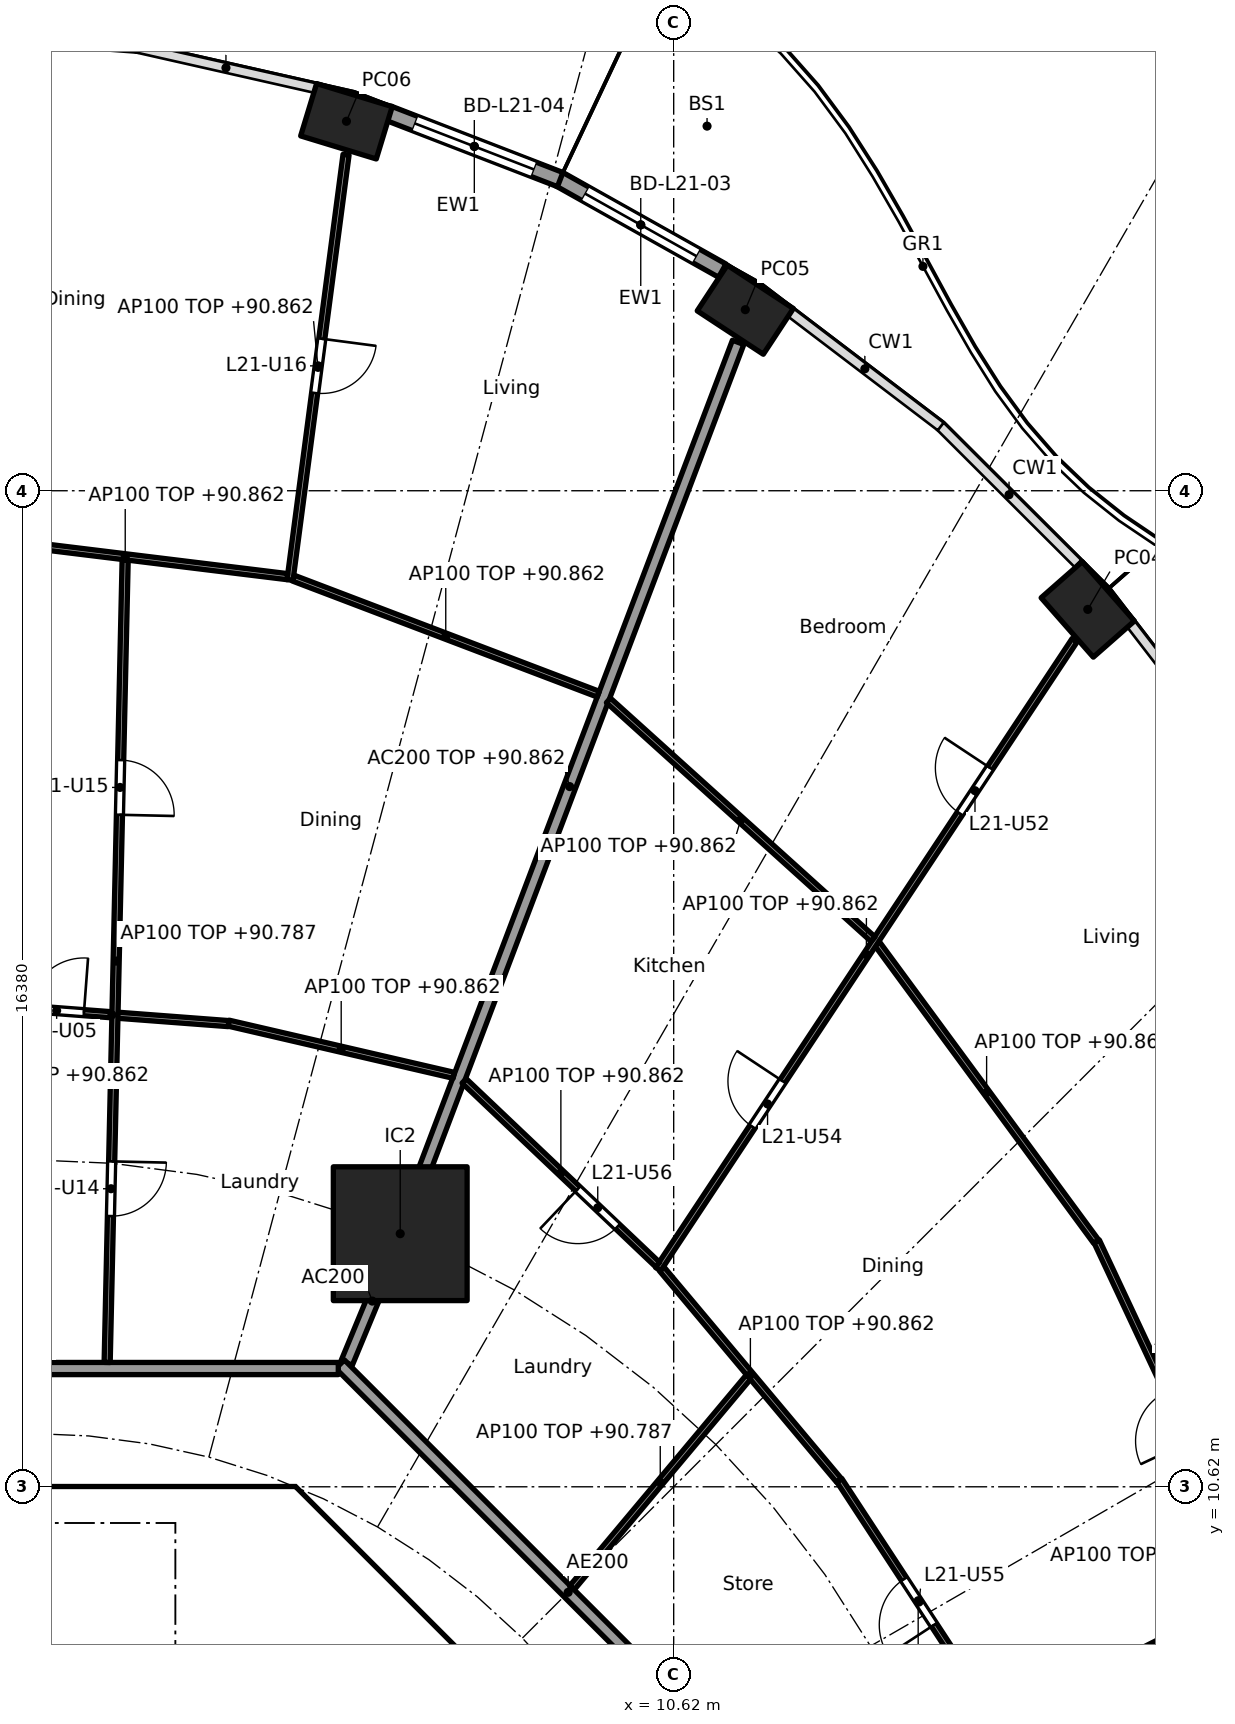
"""IFC4 building model, lengths in metres.
Left out: names, types, materials, properties, quantities, classifications, styles, units other than length and angle.
Written with IfcOpenShell. Run it as: python <this file> out.ifc"""

import sys

from ifc_helpers import new_model, si_unit, direction, frame, frame_2d, origin, origin_2d, place, context, subcontext, project, spatial, polyline, rectangle, hollow_rectangle, outline, extrude, element, fill, save


model = new_model("IFC4")
c1 = context("Model", 3, precision=1e-05, world=origin(), true_north=direction((0.0, 1.0)))
c2 = subcontext(c1, "Body", "Model", "MODEL_VIEW")
j1 = project(units=[si_unit("LENGTHUNIT", "METRE"), si_unit("PLANEANGLEUNIT", "RADIAN")], contexts=[c1])
p1 = place(None, origin())
s1 = spatial("IfcSite", under=j1, at=p1, CompositionType="ELEMENT")
p2 = place(p1, origin())
s2 = spatial("IfcBuilding", under=s1, at=p2, CompositionType="ELEMENT")
p3 = place(p2, frame((0.0, 0.0, 88.1)))
s3 = spatial("IfcBuildingStorey", under=s2, at=p3, CompositionType="ELEMENT", Elevation=88.1)
for number, where, z_axis, x_axis in (
    (1, (17.43, 25.049, 0.0), (0.0, 0.0, 1.0), (-0.66, 0.751, 0.0)),
    (2, (11.798, 29.978, 0.0), (0.0, 0.0, 1.0), (-0.836, 0.549, 0.0)),
    (3, (5.239, 33.076, 0.0), (0.0, 0.0, 1.0), (-0.957, 0.292, 0.0)),
):
    element("IfcColumn", number, at=place(p3, frame(where, z_axis=z_axis, x_axis=x_axis)), inside=s3, PredefinedType="COLUMN", context=c2, shape_type="SweptSolid", body=[
        extrude(hollow_rectangle(XDim=1.3, YDim=0.9, WallThickness=0.045, at=origin_2d()), origin(), (0.0, 0.0, 1.0), 3.7),
    ])
p4 = place(p3, frame((6.123, 14.782, 0.0), z_axis=(0.0, 0.0, 1.0), x_axis=(1.0, 0.0, 0.0)))
e4 = element("IfcColumn", 4, at=p4, inside=s3, PredefinedType="COLUMN", context=c2, shape_type="SweptSolid", body=[
    extrude(rectangle(XDim=2.2, YDim=2.2, at=origin_2d()), origin(), (0.0, 0.0, 1.0), 3.7),
])
p5 = place(p3, frame((8.737, 32.125, 0.0), z_axis=(0.0, 0.0, 1.0), x_axis=(0.872071158476, -0.489379090843, 0.0)))
e5 = element("IfcWall", 5, at=p5, inside=s3, PredefinedType="SOLIDWALL", context=c2, shape_type="SweptSolid", body=[
    extrude(rectangle(XDim=3.076, YDim=0.25, at=frame_2d((1.538, 0.0))), origin(), (0.0, 0.0, 1.0), 3.44),
])
p6 = place(p5, frame((0.488, 0.0, 0.0)))
e6 = element("IfcOpeningElement", 6, at=p6, cuts=e5, PredefinedType="OPENING", context=c2, shape_type="SweptSolid", body=[
    extrude(rectangle(XDim=2.1, YDim=2.4, at=frame_2d((1.05, 1.2))), frame((0.0, 0.135, 0.0), z_axis=(0.0, -1.0, 0.0), x_axis=(1.0, 0.0, 0.0)), (0.0, 0.0, 1.0), 0.27),
])
p7 = place(p3, frame((5.929, 33.208, 0.0), z_axis=(0.0, 0.0, 1.0), x_axis=(0.932837560624, -0.360297218263, 0.0)))
e7 = element("IfcWall", 7, at=p7, inside=s3, PredefinedType="SOLIDWALL", context=c2, shape_type="SweptSolid", body=[
    extrude(rectangle(XDim=3.028, YDim=0.25, at=frame_2d((1.514, 0.0))), origin(), (0.0, 0.0, 1.0), 3.44),
])
p8 = place(p7, frame((0.464, 0.0, 0.0)))
e8 = element("IfcOpeningElement", 8, at=p8, cuts=e7, PredefinedType="OPENING", context=c2, shape_type="SweptSolid", body=[
    extrude(rectangle(XDim=2.1, YDim=2.4, at=frame_2d((1.05, 1.2))), frame((0.0, 0.135, 0.0), z_axis=(0.0, -1.0, 0.0), x_axis=(1.0, 0.0, 0.0)), (0.0, 0.0, 1.0), 0.27),
])
p9 = place(p3, frame((9.988, 4.613, 0.0), z_axis=(0.0, 0.0, 1.0), x_axis=(-0.707106781187, 0.707106781187, 0.0)))
e9 = element("IfcWall", 9, at=p9, inside=s3, PredefinedType="SHEAR", context=c2, shape_type="SweptSolid", body=[
    extrude(rectangle(XDim=7.602, YDim=0.6, at=frame_2d((3.801, 0.0))), origin(), (0.0, 0.0, 1.0), 3.44),
])
p10 = place(p9, frame((3.201, 0.0, 0.0)))
e10 = element("IfcOpeningElement", 10, at=p10, cuts=e9, PredefinedType="OPENING", context=c2, shape_type="SweptSolid", body=[
    extrude(rectangle(XDim=1.2, YDim=2.1, at=frame_2d((0.6, 1.05))), frame((0.0, 0.31, 0.0), z_axis=(0.0, -1.0, 0.0), x_axis=(1.0, 0.0, 0.0)), (0.0, 0.0, 1.0), 0.62),
])
p11 = place(p3, frame((4.0, 7.025, 0.0), z_axis=(0.0, 0.0, 1.0), x_axis=(0.0, 1.0, 0.0)))
e11 = element("IfcWall", 11, at=p11, inside=s3, PredefinedType="SOLIDWALL", context=c2, shape_type="SweptSolid", body=[
    extrude(rectangle(XDim=3.0, YDim=0.2, at=frame_2d((1.5, 0.0))), origin(), (0.0, 0.0, 1.0), 3.44),
])
p12 = place(p11, frame((0.925, 0.0, 0.0)))
e12 = element("IfcOpeningElement", 12, at=p12, cuts=e11, PredefinedType="OPENING", context=c2, shape_type="SweptSolid", body=[
    extrude(rectangle(XDim=1.1, YDim=2.1, at=frame_2d((0.55, 1.05))), frame((0.0, 0.11, 0.0), z_axis=(0.0, -1.0, 0.0), x_axis=(1.0, 0.0, 0.0)), (0.0, 0.0, 1.0), 0.22),
])
p13 = place(p3, origin())
e13 = element("IfcWall", 13, at=p13, inside=s3, PredefinedType="SHEAR", context=c2, shape_type="SweptSolid", body=[
    extrude(outline(polyline([(-4.152, 10.025), (-4.401, 9.776), (-4.825, 10.2), (-4.401, 10.625), (4.401, 10.625), (4.825, 10.2), (4.401, 9.776), (4.152, 10.025), (-4.152, 10.025)])), origin(), (0.0, 0.0, 1.0), 3.44),
])
p14 = place(p3, frame((5.243, 12.657, 0.0), z_axis=(0.0, 0.0, 1.0), x_axis=(0.382724096228, 0.923862687939, 0.0)))
e14 = element("IfcWall", 14, at=p14, inside=s3, PredefinedType="PARTITIONING", context=c2, shape_type="SweptSolid", body=[
    extrude(rectangle(XDim=2.201, YDim=0.2, at=frame_2d((1.1, 0.0))), origin(), (0.0, 0.0, 1.0), 3.44),
])
p15 = place(p3, frame((6.141, 14.829, 0.0), z_axis=(0.0, 0.0, 1.0), x_axis=(0.354477134193, 0.935064682968, 0.0)))
e15 = element("IfcWall", 15, at=p15, inside=s3, PredefinedType="PARTITIONING", context=c2, shape_type="SweptSolid", body=[
    extrude(rectangle(XDim=15.626, YDim=0.2, at=frame_2d((7.813, 0.0))), origin(), (0.0, 0.0, 1.0), 2.762),
])
p16 = place(p3, frame((12.635, 5.134, 0.0), z_axis=(0.0, 0.0, 1.0), x_axis=(-0.707106781187, 0.707106781187, 0.0)))
e16 = element("IfcWall", 16, at=p16, inside=s3, PredefinedType="PARTITIONING", context=c2, shape_type="SweptSolid", body=[
    extrude(rectangle(XDim=10.609, YDim=0.2, at=frame_2d((5.305, 0.0))), origin(), (0.0, 0.0, 1.0), 3.44),
])
p17 = place(p3, frame((5.104, 12.565, 0.0), z_axis=(0.0, 0.0, 1.0), x_axis=(-1.0, 0.0, 0.0)))
e17 = element("IfcWall", 17, at=p17, inside=s3, PredefinedType="PARTITIONING", context=c2, shape_type="SweptSolid", body=[
    extrude(rectangle(XDim=10.409, YDim=0.2, at=frame_2d((5.205, 0.0))), origin(), (0.0, 0.0, 1.0), 3.44),
])
p18 = place(p17, frame((8.508, 0.0, 0.0)))
e18 = element("IfcOpeningElement", 18, at=p18, cuts=e17, PredefinedType="OPENING", context=c2, shape_type="SweptSolid", body=[
    extrude(rectangle(XDim=1.0, YDim=2.1, at=frame_2d((0.5, 1.05))), frame((0.0, 0.11, 0.0), z_axis=(0.0, -1.0, 0.0), x_axis=(1.0, 0.0, 0.0)), (0.0, 0.0, 1.0), 0.22),
])
p19 = place(p3, frame((14.827, 6.146, 0.0), z_axis=(0.0, 0.0, 1.0), x_axis=(0.892068075337, 0.451901038906, 0.0)))
e19 = element("IfcWall", 19, at=p19, inside=s3, PredefinedType="PARTITIONING", context=c2, shape_type="SweptSolid", body=[
    extrude(rectangle(XDim=10.32, YDim=0.1, at=frame_2d((5.16, 0.0))), origin(), (0.0, 0.0, 1.0), 2.762),
])
p20 = place(p19, frame((7.763, 0.0, 0.0)))
e20 = element("IfcOpeningElement", 20, at=p20, cuts=e19, PredefinedType="OPENING", context=c2, shape_type="SweptSolid", body=[
    extrude(rectangle(XDim=0.9, YDim=2.1, at=frame_2d((0.45, 1.05))), frame((0.0, 0.06, 0.0), z_axis=(0.0, -1.0, 0.0), x_axis=(1.0, 0.0, 0.0)), (0.0, 0.0, 1.0), 0.12),
])
p21 = place(p3, frame((15.938, 6.764, 0.0), z_axis=(0.0, 0.0, 1.0), x_axis=(-0.547472878942, 0.836823426311, 0.0)))
e21 = element("IfcWall", 21, at=p21, inside=s3, PredefinedType="PARTITIONING", context=c2, shape_type="SweptSolid", body=[
    extrude(rectangle(XDim=4.738, YDim=0.1, at=frame_2d((2.369, 0.0))), origin(), (0.0, 0.0, 1.0), 2.762),
])
p22 = place(p21, frame((1.894, 0.0, 0.0)))
e22 = element("IfcOpeningElement", 22, at=p22, cuts=e21, PredefinedType="OPENING", context=c2, shape_type="SweptSolid", body=[
    extrude(rectangle(XDim=0.9, YDim=2.1, at=frame_2d((0.45, 1.05))), frame((0.0, 0.06, 0.0), z_axis=(0.0, -1.0, 0.0), x_axis=(1.0, 0.0, 0.0)), (0.0, 0.0, 1.0), 0.12),
])
p23 = place(p3, frame((20.252, 8.95, 0.0), z_axis=(0.0, 0.0, 1.0), x_axis=(-0.424580709335, 0.905390093419, 0.0)))
e23 = element("IfcWall", 23, at=p23, inside=s3, PredefinedType="PARTITIONING", context=c2, shape_type="SweptSolid", body=[
    extrude(rectangle(XDim=6.304, YDim=0.1, at=frame_2d((3.152, 0.0))), origin(), (0.0, 0.0, 1.0), 2.762),
])
p24 = place(p23, frame((2.677, 0.0, 0.0)))
e24 = element("IfcOpeningElement", 24, at=p24, cuts=e23, PredefinedType="OPENING", context=c2, shape_type="SweptSolid", body=[
    extrude(rectangle(XDim=0.9, YDim=2.1, at=frame_2d((0.45, 1.05))), frame((0.0, 0.06, 0.0), z_axis=(0.0, -1.0, 0.0), x_axis=(1.0, 0.0, 0.0)), (0.0, 0.0, 1.0), 0.12),
])
p25 = place(p3, frame((13.339, 10.725, 0.0), z_axis=(0.0, 0.0, 1.0), x_axis=(-0.642515455924, 0.766272724882, 0.0)))
e25 = element("IfcWall", 25, at=p25, inside=s3, PredefinedType="PARTITIONING", context=c2, shape_type="SweptSolid", body=[
    extrude(rectangle(XDim=4.537, YDim=0.1, at=frame_2d((2.269, 0.0))), origin(), (0.0, 0.0, 1.0), 2.762),
])
p26 = place(p3, frame((17.567, 14.653, 0.0), z_axis=(0.0, 0.0, 1.0), x_axis=(-0.592391983588, 0.80564988536, 0.0)))
e26 = element("IfcWall", 26, at=p26, inside=s3, PredefinedType="PARTITIONING", context=c2, shape_type="SweptSolid", body=[
    extrude(rectangle(XDim=6.08, YDim=0.1, at=frame_2d((3.04, 0.0))), origin(), (0.0, 0.0, 1.0), 2.762),
])
p27 = place(p3, frame((8.949, 8.961, 0.0), z_axis=(0.0, 0.0, 1.0), x_axis=(0.642048217601, 0.766664259162, 0.0)))
e27 = element("IfcWall", 27, at=p27, inside=s3, PredefinedType="PARTITIONING", context=c2, shape_type="SweptSolid", body=[
    extrude(rectangle(XDim=4.518, YDim=0.1, at=frame_2d((2.259, 0.0))), origin(), (0.0, 0.0, 1.0), 2.687),
])
p28 = place(p3, frame((10.364, 14.198, 0.0), z_axis=(0.0, 0.0, 1.0), x_axis=(0.552104552927, 0.833774887267, 0.0)))
e28 = element("IfcWall", 28, at=p28, inside=s3, PredefinedType="PARTITIONING", context=c2, shape_type="SweptSolid", body=[
    extrude(rectangle(XDim=12.407, YDim=0.1, at=frame_2d((6.203, 0.0))), origin(), (0.0, 0.0, 1.0), 2.762),
])
p29 = place(p28, frame((8.988, 0.0, 0.0)))
e29 = element("IfcOpeningElement", 29, at=p29, cuts=e28, PredefinedType="OPENING", context=c2, shape_type="SweptSolid", body=[
    extrude(rectangle(XDim=0.9, YDim=2.1, at=frame_2d((0.45, 1.05))), frame((0.0, 0.06, 0.0), z_axis=(0.0, -1.0, 0.0), x_axis=(1.0, 0.0, 0.0)), (0.0, 0.0, 1.0), 0.12),
])
p30 = place(p28, frame((2.809, 0.0, 0.0)))
e30 = element("IfcOpeningElement", 30, at=p30, cuts=e28, PredefinedType="OPENING", context=c2, shape_type="SweptSolid", body=[
    extrude(rectangle(XDim=0.9, YDim=2.1, at=frame_2d((0.45, 1.05))), frame((0.0, 0.06, 0.0), z_axis=(0.0, -1.0, 0.0), x_axis=(1.0, 0.0, 0.0)), (0.0, 0.0, 1.0), 0.12),
])
p31 = place(p3, frame((10.355, 14.274, 0.0), z_axis=(0.0, 0.0, 1.0), x_axis=(-0.725206433622, 0.688531501555, 0.0)))
e31 = element("IfcWall", 31, at=p31, inside=s3, PredefinedType="PARTITIONING", context=c2, shape_type="SweptSolid", body=[
    extrude(rectangle(XDim=4.387, YDim=0.1, at=frame_2d((2.193, 0.0))), origin(), (0.0, 0.0, 1.0), 2.762),
])
p32 = place(p31, frame((0.907, 0.0, 0.0)))
e32 = element("IfcOpeningElement", 32, at=p32, cuts=e31, PredefinedType="OPENING", context=c2, shape_type="SweptSolid", body=[
    extrude(rectangle(XDim=0.9, YDim=2.1, at=frame_2d((0.45, 1.05))), frame((0.0, 0.06, 0.0), z_axis=(0.0, -1.0, 0.0), x_axis=(1.0, 0.0, 0.0)), (0.0, 0.0, 1.0), 0.12),
])
p33 = place(p3, frame((13.898, 19.625, 0.0), z_axis=(0.0, 0.0, 1.0), x_axis=(-0.742396654702, 0.669960601146, 0.0)))
e33 = element("IfcWall", 33, at=p33, inside=s3, PredefinedType="PARTITIONING", context=c2, shape_type="SweptSolid", body=[
    extrude(rectangle(XDim=5.861, YDim=0.1, at=frame_2d((2.931, 0.0))), origin(), (0.0, 0.0, 1.0), 2.762),
])
p34 = place(p3, frame((7.004, 17.386, 0.0), z_axis=(0.0, 0.0, 1.0), x_axis=(-0.974179728512, 0.225773905837, 0.0)))
e34 = element("IfcWall", 34, at=p34, inside=s3, PredefinedType="PARTITIONING", context=c2, shape_type="SweptSolid", body=[
    extrude(rectangle(XDim=3.802, YDim=0.1, at=frame_2d((1.901, 0.0))), origin(), (0.0, 0.0, 1.0), 2.762),
])
p35 = place(p3, frame((9.379, 23.655, 0.0), z_axis=(0.0, 0.0, 1.0), x_axis=(-0.934613076136, 0.355666132653, 0.0)))
e35 = element("IfcWall", 35, at=p35, inside=s3, PredefinedType="PARTITIONING", context=c2, shape_type="SweptSolid", body=[
    extrude(rectangle(XDim=5.366, YDim=0.1, at=frame_2d((2.683, 0.0))), origin(), (0.0, 0.0, 1.0), 2.762),
])
p36 = place(p3, frame((3.299, 18.237, 0.0), z_axis=(0.0, 0.0, 1.0), x_axis=(-0.997152243414, 0.075414875552, 0.0)))
e36 = element("IfcWall", 36, at=p36, inside=s3, PredefinedType="PARTITIONING", context=c2, shape_type="SweptSolid", body=[
    extrude(rectangle(XDim=3.846, YDim=0.1, at=frame_2d((1.923, 0.0))), origin(), (0.0, 0.0, 1.0), 2.762),
])
p37 = place(p36, frame((2.385, 0.0, 0.0)))
e37 = element("IfcOpeningElement", 37, at=p37, cuts=e36, PredefinedType="OPENING", context=c2, shape_type="SweptSolid", body=[
    extrude(rectangle(XDim=0.9, YDim=2.1, at=frame_2d((0.45, 1.05))), frame((0.0, 0.06, 0.0), z_axis=(0.0, -1.0, 0.0), x_axis=(1.0, 0.0, 0.0)), (0.0, 0.0, 1.0), 0.12),
])
p38 = place(p3, frame((4.311, 25.531, 0.0), z_axis=(0.0, 0.0, 1.0), x_axis=(0.130604008227, 0.991434613595, 0.0)))
e38 = element("IfcWall", 38, at=p38, inside=s3, PredefinedType="PARTITIONING", context=c2, shape_type="SweptSolid", body=[
    extrude(rectangle(XDim=7.055, YDim=0.1, at=frame_2d((3.527, 0.0))), origin(), (0.0, 0.0, 1.0), 2.762),
])
p39 = place(p38, frame((3.102, 0.0, 0.0)))
e39 = element("IfcOpeningElement", 39, at=p39, cuts=e38, PredefinedType="OPENING", context=c2, shape_type="SweptSolid", body=[
    extrude(rectangle(XDim=0.9, YDim=2.1, at=frame_2d((0.45, 1.05))), frame((0.0, 0.06, 0.0), z_axis=(0.0, -1.0, 0.0), x_axis=(1.0, 0.0, 0.0)), (0.0, 0.0, 1.0), 0.12),
])
p40 = place(p3, frame((4.267, 25.587, 0.0), z_axis=(0.0, 0.0, 1.0), x_axis=(-0.992576206119, 0.121624319302, 0.0)))
e40 = element("IfcWall", 40, at=p40, inside=s3, PredefinedType="PARTITIONING", context=c2, shape_type="SweptSolid", body=[
    extrude(rectangle(XDim=5.374, YDim=0.1, at=frame_2d((2.687, 0.0))), origin(), (0.0, 0.0, 1.0), 2.762),
])
p41 = place(p3, frame((1.303, 12.665, 0.0), z_axis=(0.0, 0.0, 1.0), x_axis=(0.022412244057, 0.999748814111, 0.0)))
e41 = element("IfcWall", 41, at=p41, inside=s3, PredefinedType="PARTITIONING", context=c2, shape_type="SweptSolid", body=[
    extrude(rectangle(XDim=13.203, YDim=0.1, at=frame_2d((6.601, 0.0))), origin(), (0.0, 0.0, 1.0), 2.687),
])
p42 = place(p41, frame((2.407, 0.0, 0.0)))
e42 = element("IfcOpeningElement", 42, at=p42, cuts=e41, PredefinedType="OPENING", context=c2, shape_type="SweptSolid", body=[
    extrude(rectangle(XDim=0.9, YDim=2.1, at=frame_2d((0.45, 1.05))), frame((0.0, 0.06, 0.0), z_axis=(0.0, -1.0, 0.0), x_axis=(1.0, 0.0, 0.0)), (0.0, 0.0, 1.0), 0.12),
])
p43 = place(p41, frame((9.009, 0.0, 0.0)))
e43 = element("IfcOpeningElement", 43, at=p43, cuts=e41, PredefinedType="OPENING", context=c2, shape_type="SweptSolid", body=[
    extrude(rectangle(XDim=0.9, YDim=2.1, at=frame_2d((0.45, 1.05))), frame((0.0, 0.06, 0.0), z_axis=(0.0, -1.0, 0.0), x_axis=(1.0, 0.0, 0.0)), (0.0, 0.0, 1.0), 0.12),
])
p44 = place(p6, origin())
e44 = element("IfcDoor", 44, at=p44, inside=s3, OperationType="SLIDING_TO_LEFT", PredefinedType="DOOR", context=c2, shape_type="SweptSolid", body=[
    extrude(rectangle(XDim=2.1, YDim=2.4, at=frame_2d((1.05, 1.2))), frame((0.0, 0.025, 0.0), z_axis=(0.0, -1.0, 0.0), x_axis=(1.0, 0.0, 0.0)), (0.0, 0.0, 1.0), 0.05),
])
fill(e6, e44)
p45 = place(p8, origin())
e45 = element("IfcDoor", 45, at=p45, inside=s3, OperationType="SLIDING_TO_LEFT", PredefinedType="DOOR", context=c2, shape_type="SweptSolid", body=[
    extrude(rectangle(XDim=2.1, YDim=2.4, at=frame_2d((1.05, 1.2))), frame((0.0, 0.025, 0.0), z_axis=(0.0, -1.0, 0.0), x_axis=(1.0, 0.0, 0.0)), (0.0, 0.0, 1.0), 0.05),
])
fill(e8, e45)
p46 = place(p12, origin())
e46 = element("IfcDoor", 46, at=p46, inside=s3, OperationType="SINGLE_SWING_LEFT", PredefinedType="DOOR", context=c2, shape_type="SweptSolid", body=[
    extrude(rectangle(XDim=1.1, YDim=2.1, at=frame_2d((0.55, 1.05))), frame((0.0, 0.025, 0.0), z_axis=(0.0, -1.0, 0.0), x_axis=(1.0, 0.0, 0.0)), (0.0, 0.0, 1.0), 0.05),
])
fill(e12, e46)
p47 = place(p37, frame((0.9, 0.0, 0.0), x_axis=(-1.0, 0.0, 0.0)))
e47 = element("IfcDoor", 47, at=p47, inside=s3, OperationType="SINGLE_SWING_RIGHT", PredefinedType="DOOR", context=c2, shape_type="SweptSolid", body=[
    extrude(rectangle(XDim=0.9, YDim=2.1, at=frame_2d((0.45, 1.05))), frame((0.0, 0.025, 0.0), z_axis=(0.0, -1.0, 0.0), x_axis=(1.0, 0.0, 0.0)), (0.0, 0.0, 1.0), 0.05),
])
fill(e37, e47)
p48 = place(p42, frame((0.9, 0.0, 0.0), x_axis=(-1.0, 0.0, 0.0)))
e48 = element("IfcDoor", 48, at=p48, inside=s3, OperationType="SINGLE_SWING_LEFT", PredefinedType="DOOR", context=c2, shape_type="SweptSolid", body=[
    extrude(rectangle(XDim=0.9, YDim=2.1, at=frame_2d((0.45, 1.05))), frame((0.0, 0.025, 0.0), z_axis=(0.0, -1.0, 0.0), x_axis=(1.0, 0.0, 0.0)), (0.0, 0.0, 1.0), 0.05),
])
fill(e42, e48)
p49 = place(p43, frame((0.9, 0.0, 0.0), x_axis=(-1.0, 0.0, 0.0)))
e49 = element("IfcDoor", 49, at=p49, inside=s3, OperationType="SINGLE_SWING_RIGHT", PredefinedType="DOOR", context=c2, shape_type="SweptSolid", body=[
    extrude(rectangle(XDim=0.9, YDim=2.1, at=frame_2d((0.45, 1.05))), frame((0.0, 0.025, 0.0), z_axis=(0.0, -1.0, 0.0), x_axis=(1.0, 0.0, 0.0)), (0.0, 0.0, 1.0), 0.05),
])
fill(e43, e49)
p50 = place(p39, frame((0.9, 0.0, 0.0), x_axis=(-1.0, 0.0, 0.0)))
e50 = element("IfcDoor", 50, at=p50, inside=s3, OperationType="SINGLE_SWING_LEFT", PredefinedType="DOOR", context=c2, shape_type="SweptSolid", body=[
    extrude(rectangle(XDim=0.9, YDim=2.1, at=frame_2d((0.45, 1.05))), frame((0.0, 0.025, 0.0), z_axis=(0.0, -1.0, 0.0), x_axis=(1.0, 0.0, 0.0)), (0.0, 0.0, 1.0), 0.05),
])
fill(e39, e50)
p51 = place(p29, origin())
e51 = element("IfcDoor", 51, at=p51, inside=s3, OperationType="SINGLE_SWING_RIGHT", PredefinedType="DOOR", context=c2, shape_type="SweptSolid", body=[
    extrude(rectangle(XDim=0.9, YDim=2.1, at=frame_2d((0.45, 1.05))), frame((0.0, 0.025, 0.0), z_axis=(0.0, -1.0, 0.0), x_axis=(1.0, 0.0, 0.0)), (0.0, 0.0, 1.0), 0.05),
])
fill(e29, e51)
p52 = place(p30, origin())
e52 = element("IfcDoor", 52, at=p52, inside=s3, OperationType="SINGLE_SWING_RIGHT", PredefinedType="DOOR", context=c2, shape_type="SweptSolid", body=[
    extrude(rectangle(XDim=0.9, YDim=2.1, at=frame_2d((0.45, 1.05))), frame((0.0, 0.025, 0.0), z_axis=(0.0, -1.0, 0.0), x_axis=(1.0, 0.0, 0.0)), (0.0, 0.0, 1.0), 0.05),
])
fill(e30, e52)
p53 = place(p22, origin())
e53 = element("IfcDoor", 53, at=p53, inside=s3, OperationType="SINGLE_SWING_LEFT", PredefinedType="DOOR", context=c2, shape_type="SweptSolid", body=[
    extrude(rectangle(XDim=0.9, YDim=2.1, at=frame_2d((0.45, 1.05))), frame((0.0, 0.025, 0.0), z_axis=(0.0, -1.0, 0.0), x_axis=(1.0, 0.0, 0.0)), (0.0, 0.0, 1.0), 0.05),
])
fill(e22, e53)
p54 = place(p32, origin())
e54 = element("IfcDoor", 54, at=p54, inside=s3, OperationType="SINGLE_SWING_RIGHT", PredefinedType="DOOR", context=c2, shape_type="SweptSolid", body=[
    extrude(rectangle(XDim=0.9, YDim=2.1, at=frame_2d((0.45, 1.05))), frame((0.0, 0.025, 0.0), z_axis=(0.0, -1.0, 0.0), x_axis=(1.0, 0.0, 0.0)), (0.0, 0.0, 1.0), 0.05),
])
fill(e32, e54)
save(model, sys.argv[1])
